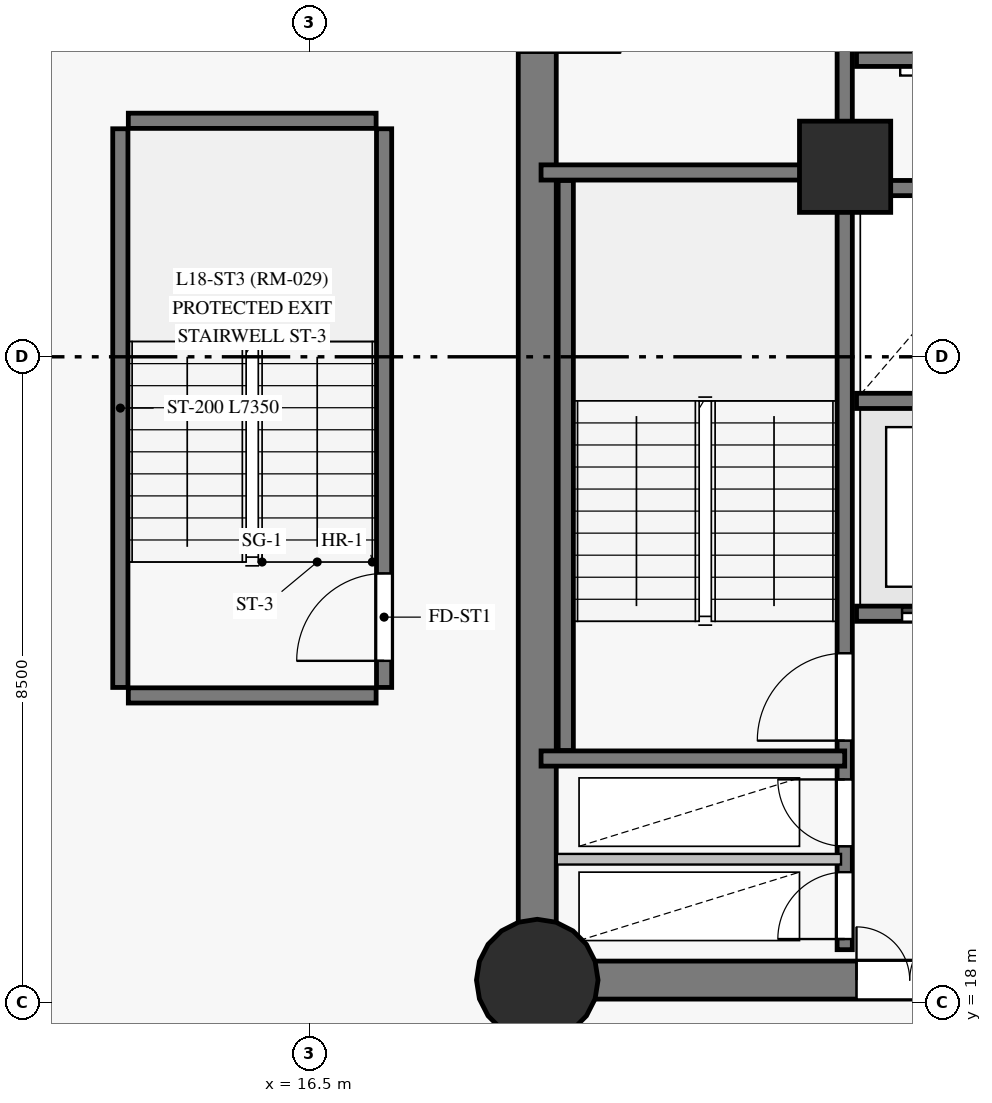
"""IFC4 building model, lengths in metres.
Left out: names, types, materials, properties, quantities, classifications, styles, units other than length and angle.
Written with IfcOpenShell. Run it as: python <this file> out.ifc"""

import sys

from ifc_helpers import new_model, si_unit, direction, frame, frame_2d, origin, origin_with_axes, origin_2d, place, context, subcontext, project, spatial, rectangle, circle, extrude, source, transform, mapped, element, fill, save


model = new_model("IFC4")
c1 = context("Model", 3, precision=1e-05, world=origin(), true_north=direction((0.0, 1.0)))
c2 = subcontext(c1, "Body", "Model", "MODEL_VIEW")
j1 = project(units=[si_unit("LENGTHUNIT", "METRE"), si_unit("PLANEANGLEUNIT", "RADIAN")], contexts=[c1])
p1 = place(None, origin())
s1 = spatial("IfcSite", under=j1, at=p1, CompositionType="ELEMENT")
p2 = place(p1, origin())
s2 = spatial("IfcBuilding", under=s1, at=p2, CompositionType="ELEMENT")
p3 = place(p2, frame((0.0, 0.0, 69.7)))
s3 = spatial("IfcBuildingStorey", under=s2, at=p3, CompositionType="ELEMENT", Elevation=69.7)
p4 = place(p3, frame((19.5, 18.3, 0.0), z_axis=(0.0, 0.0, 1.0), x_axis=(1.0, 0.0, 0.0)))
e1 = element("IfcWall", 1, at=p4, inside=s3, PredefinedType="SHEAR", context=c2, shape_type="SweptSolid", body=[
    extrude(rectangle(XDim=7.05, YDim=0.5, at=frame_2d((3.525, 0.0))), origin(), (0.0, 0.0, 1.0), 3.35),
])
p5 = place(p4, frame((4.2, 0.0, 0.0)))
e2 = element("IfcOpeningElement", 2, at=p5, cuts=e1, PredefinedType="OPENING", context=c2, shape_type="SweptSolid", body=[
    extrude(rectangle(XDim=1.4, YDim=2.2, at=frame_2d((0.7, 1.1))), frame((0.0, 0.26, 0.0), z_axis=(0.0, -1.0, 0.0), x_axis=(1.0, 0.0, 0.0)), (0.0, 0.0, 1.0), 0.52),
])
p6 = place(p3, frame((19.5, 34.7, 0.0), z_axis=(0.0, 0.0, 1.0), x_axis=(0.0, -1.0, 0.0)))
e3 = element("IfcWall", 3, at=p6, inside=s3, PredefinedType="SHEAR", context=c2, shape_type="SweptSolid", body=[
    extrude(rectangle(XDim=16.4, YDim=0.5, at=frame_2d((8.2, 0.0))), origin(), (0.0, 0.0, 1.0), 3.35),
])
p7 = place(p6, frame((3.1, 0.0, 0.0)))
e4 = element("IfcOpeningElement", 4, at=p7, cuts=e3, PredefinedType="OPENING", context=c2, shape_type="SweptSolid", body=[
    extrude(rectangle(XDim=1.1, YDim=2.15, at=frame_2d((0.55, 1.075))), frame((0.0, 0.26, 0.0), z_axis=(0.0, -1.0, 0.0), x_axis=(1.0, 0.0, 0.0)), (0.0, 0.0, 1.0), 0.52),
])
m1 = source(origin_with_axes(), c2, "Body", "SweptSolid", [
    extrude(circle(Radius=0.8, at=origin_2d()), origin(), (0.0, 0.0, 1.0), 3.6),
])
p8 = place(p3, frame((19.5, 18.3, 0.0), z_axis=(0.0, 0.0, 1.0), x_axis=(1.0, 0.0, 0.0)))
e5 = element("IfcColumn", 5, at=p8, inside=s3, PredefinedType="COLUMN", context=c2, shape_type="MappedRepresentation", body=[
    mapped(m1, transform((0.0, 0.0, 0.0), scale=1.0)),
])
m2 = source(origin_with_axes(), c2, "Body", "SweptSolid", [
    extrude(rectangle(XDim=1.2, YDim=1.2, at=origin_2d()), origin(), (0.0, 0.0, 1.0), 3.6),
])
p9 = place(p3, frame((23.55, 29.0, 0.0), z_axis=(0.0, 0.0, 1.0), x_axis=(1.0, 0.0, 0.0)))
e6 = element("IfcColumn", 6, at=p9, inside=s3, PredefinedType="COLUMN", context=c2, shape_type="MappedRepresentation", body=[
    mapped(m2, transform((0.0, 0.0, 0.0), scale=1.0)),
])
p10 = place(p3, frame((23.545, 18.7, 0.0), z_axis=(0.0, 0.0, 1.0), x_axis=(0.0, 1.0, 0.0)))
e7 = element("IfcWall", 7, at=p10, inside=s3, PredefinedType="SHEAR", context=c2, shape_type="SweptSolid", body=[
    extrude(rectangle(XDim=15.6, YDim=0.2, at=frame_2d((7.8, 0.0))), origin(), (0.0, 0.0, 1.0), 3.35),
])
p11 = place(p10, frame((2.75, 0.0, 0.0)))
e8 = element("IfcOpeningElement", 8, at=p11, cuts=e7, PredefinedType="OPENING", context=c2, shape_type="SweptSolid", body=[
    extrude(rectangle(XDim=1.15, YDim=2.15, at=frame_2d((0.575, 1.075))), frame((0.0, 0.11, 0.0), z_axis=(0.0, -1.0, 0.0), x_axis=(1.0, 0.0, 0.0)), (0.0, 0.0, 1.0), 0.22),
])
p12 = place(p10, frame((0.14, 0.0, 0.0)))
e9 = element("IfcOpeningElement", 9, at=p12, cuts=e7, PredefinedType="OPENING", context=c2, shape_type="SweptSolid", body=[
    extrude(rectangle(XDim=0.88, YDim=2.1, at=frame_2d((0.44, 1.05))), frame((0.0, 0.11, 0.0), z_axis=(0.0, -1.0, 0.0), x_axis=(1.0, 0.0, 0.0)), (0.0, 0.0, 1.0), 0.22),
])
p13 = place(p10, frame((1.36, 0.0, 0.0)))
e10 = element("IfcOpeningElement", 10, at=p13, cuts=e7, PredefinedType="OPENING", context=c2, shape_type="SweptSolid", body=[
    extrude(rectangle(XDim=0.88, YDim=2.1, at=frame_2d((0.44, 1.05))), frame((0.0, 0.11, 0.0), z_axis=(0.0, -1.0, 0.0), x_axis=(1.0, 0.0, 0.0)), (0.0, 0.0, 1.0), 0.22),
])
p14 = place(p10, frame((12.1, 0.0, 0.0)))
e11 = element("IfcOpeningElement", 11, at=p14, cuts=e7, PredefinedType="OPENING", context=c2, shape_type="SweptSolid", body=[
    extrude(rectangle(XDim=1.12, YDim=2.15, at=frame_2d((0.56, 1.075))), frame((0.0, 0.11, 0.0), z_axis=(0.0, -1.0, 0.0), x_axis=(1.0, 0.0, 0.0)), (0.0, 0.0, 1.0), 0.22),
])
p15 = place(p10, frame((14.05, 0.0, 0.0)))
e12 = element("IfcOpeningElement", 12, at=p15, cuts=e7, PredefinedType="OPENING", context=c2, shape_type="SweptSolid", body=[
    extrude(rectangle(XDim=1.12, YDim=2.15, at=frame_2d((0.56, 1.075))), frame((0.0, 0.11, 0.0), z_axis=(0.0, -1.0, 0.0), x_axis=(1.0, 0.0, 0.0)), (0.0, 0.0, 1.0), 0.22),
])
p16 = place(p3, frame((23.7, 23.12, 0.0), z_axis=(0.0, 0.0, 1.0), x_axis=(1.0, 0.0, 0.0)))
e13 = element("IfcWall", 13, at=p16, inside=s3, PredefinedType="SHEAR", context=c2, shape_type="SweptSolid", body=[
    extrude(rectangle(XDim=9.6, YDim=0.2, at=frame_2d((4.8, 0.0))), origin(), (0.0, 0.0, 1.0), 3.35),
])
p17 = place(p16, frame((0.6, 0.0, 0.0)))
e14 = element("IfcOpeningElement", 14, at=p17, cuts=e13, PredefinedType="OPENING", context=c2, shape_type="SweptSolid", body=[
    extrude(rectangle(XDim=1.1, YDim=2.15, at=frame_2d((0.55, 1.075))), frame((0.0, 0.11, 0.0), z_axis=(0.0, -1.0, 0.0), x_axis=(1.0, 0.0, 0.0)), (0.0, 0.0, 1.0), 0.22),
])
p18 = place(p16, frame((2.98, 0.0, 0.0)))
e15 = element("IfcOpeningElement", 15, at=p18, cuts=e13, PredefinedType="OPENING", context=c2, shape_type="SweptSolid", body=[
    extrude(rectangle(XDim=1.1, YDim=2.15, at=frame_2d((0.55, 1.075))), frame((0.0, 0.11, 0.0), z_axis=(0.0, -1.0, 0.0), x_axis=(1.0, 0.0, 0.0)), (0.0, 0.0, 1.0), 0.22),
])
p19 = place(p16, frame((5.36, 0.0, 0.0)))
e16 = element("IfcOpeningElement", 16, at=p19, cuts=e13, PredefinedType="OPENING", context=c2, shape_type="SweptSolid", body=[
    extrude(rectangle(XDim=1.1, YDim=2.15, at=frame_2d((0.55, 1.075))), frame((0.0, 0.11, 0.0), z_axis=(0.0, -1.0, 0.0), x_axis=(1.0, 0.0, 0.0)), (0.0, 0.0, 1.0), 0.22),
])
p20 = place(p16, frame((7.74, 0.0, 0.0)))
e17 = element("IfcOpeningElement", 17, at=p20, cuts=e13, PredefinedType="OPENING", context=c2, shape_type="SweptSolid", body=[
    extrude(rectangle(XDim=1.1, YDim=2.15, at=frame_2d((0.55, 1.075))), frame((0.0, 0.11, 0.0), z_axis=(0.0, -1.0, 0.0), x_axis=(1.0, 0.0, 0.0)), (0.0, 0.0, 1.0), 0.22),
])
for number, where, z_axis, x_axis in (
    (18, (23.7, 25.92, 0.0), (0.0, 0.0, 1.0), (1.0, 0.0, 0.0)),
    (19, (23.7, 28.72, 0.0), (0.0, 0.0, 1.0), (1.0, 0.0, 0.0)),
):
    element("IfcWall", number, at=place(p3, frame(where, z_axis=z_axis, x_axis=x_axis)), inside=s3, PredefinedType="SHEAR", context=c2, shape_type="SweptSolid", body=[
        extrude(rectangle(XDim=9.6, YDim=0.2, at=frame_2d((4.8, 0.0))), origin(), (0.0, 0.0, 1.0), 3.35),
    ])
p21 = place(p3, frame((19.875, 21.32, 0.0), z_axis=(0.0, 0.0, 1.0), x_axis=(0.0, 1.0, 0.0)))
e20 = element("IfcWall", 20, at=p21, inside=s3, PredefinedType="SHEAR", context=c2, shape_type="SweptSolid", body=[
    extrude(rectangle(XDim=7.5, YDim=0.2, at=frame_2d((3.75, 0.0))), origin(), (0.0, 0.0, 1.0), 3.35),
])
p22 = place(p3, frame((14.015, 22.15, 0.0), z_axis=(0.0, 0.0, 1.0), x_axis=(0.0, 1.0, 0.0)))
e21 = element("IfcWall", 21, at=p22, inside=s3, PredefinedType="SHEAR", context=c2, shape_type="SweptSolid", body=[
    extrude(rectangle(XDim=7.35, YDim=0.2, at=frame_2d((3.675, 0.0))), origin(), (0.0, 0.0, 1.0), 3.35),
])
p23 = place(p3, frame((17.485, 22.15, 0.0), z_axis=(0.0, 0.0, 1.0), x_axis=(0.0, 1.0, 0.0)))
e22 = element("IfcWall", 22, at=p23, inside=s3, PredefinedType="SHEAR", context=c2, shape_type="SweptSolid", body=[
    extrude(rectangle(XDim=7.35, YDim=0.2, at=frame_2d((3.675, 0.0))), origin(), (0.0, 0.0, 1.0), 3.35),
])
p24 = place(p23, frame((0.35, 0.0, 0.0)))
e23 = element("IfcOpeningElement", 23, at=p24, cuts=e22, PredefinedType="OPENING", context=c2, shape_type="SweptSolid", body=[
    extrude(rectangle(XDim=1.15, YDim=2.15, at=frame_2d((0.575, 1.075))), frame((0.0, 0.11, 0.0), z_axis=(0.0, -1.0, 0.0), x_axis=(1.0, 0.0, 0.0)), (0.0, 0.0, 1.0), 0.22),
])
for number, where, z_axis, x_axis in (
    (24, (19.55, 21.215, 0.0), (0.0, 0.0, 1.0), (1.0, 0.0, 0.0)),
    (25, (19.55, 28.925, 0.0), (0.0, 0.0, 1.0), (1.0, 0.0, 0.0)),
):
    element("IfcWall", number, at=place(p3, frame(where, z_axis=z_axis, x_axis=x_axis)), inside=s3, PredefinedType="SHEAR", context=c2, shape_type="SweptSolid", body=[
        extrude(rectangle(XDim=3.995, YDim=0.2, at=frame_2d((1.998, 0.0))), origin(), (0.0, 0.0, 1.0), 3.35),
    ])
for number, where, z_axis, x_axis in (
    (26, (14.12, 22.045, 0.0), (0.0, 0.0, 1.0), (1.0, 0.0, 0.0)),
    (27, (14.12, 29.605, 0.0), (0.0, 0.0, 1.0), (1.0, 0.0, 0.0)),
):
    element("IfcWall", number, at=place(p3, frame(where, z_axis=z_axis, x_axis=x_axis)), inside=s3, PredefinedType="SHEAR", context=c2, shape_type="SweptSolid", body=[
        extrude(rectangle(XDim=3.26, YDim=0.2, at=frame_2d((1.63, 0.0))), origin(), (0.0, 0.0, 1.0), 3.35),
    ])
p25 = place(p3, frame((23.7, 30.42, 0.0), z_axis=(0.0, 0.0, 1.0), x_axis=(1.0, 0.0, 0.0)))
e28 = element("IfcWall", 28, at=p25, inside=s3, PredefinedType="SHEAR", context=c2, shape_type="SweptSolid", body=[
    extrude(rectangle(XDim=2.78, YDim=0.2, at=frame_2d((1.39, 0.0))), origin(), (0.0, 0.0, 1.0), 3.35),
])
p26 = place(p3, frame((19.757, 19.89, 0.0), z_axis=(0.0, 0.0, 1.0), x_axis=(1.0, 0.0, 0.0)))
e29 = element("IfcWall", 29, at=p26, inside=s3, PredefinedType="PARTITIONING", context=c2, shape_type="SweptSolid", body=[
    extrude(rectangle(XDim=3.739, YDim=0.14, at=frame_2d((1.87, 0.0))), origin(), (0.0, 0.0, 1.0), 3.35),
])
m3 = source(origin_with_axes(), c2, "Body", "SweptSolid", [
    extrude(rectangle(XDim=1.15, YDim=2.15, at=frame_2d((0.575, 1.075))), frame((0.0, 0.025, 0.0), z_axis=(0.0, -1.0, 0.0), x_axis=(1.0, 0.0, 0.0)), (0.0, 0.0, 1.0), 0.05),
])
p27 = place(p11, origin())
e30 = element("IfcDoor", 30, at=p27, inside=s3, OperationType="SINGLE_SWING_LEFT", PredefinedType="DOOR", context=c2, shape_type="MappedRepresentation", body=[
    mapped(m3, transform((0.0, 0.0, 0.0), scale=1.0)),
])
fill(e8, e30)
m4 = source(origin_with_axes(), c2, "Body", "SweptSolid", [
    extrude(rectangle(XDim=1.1, YDim=2.15, at=frame_2d((0.55, 1.075))), frame((0.0, 0.025, 0.0), z_axis=(0.0, -1.0, 0.0), x_axis=(1.0, 0.0, 0.0)), (0.0, 0.0, 1.0), 0.05),
])
p28 = place(p7, origin())
e31 = element("IfcDoor", 31, at=p28, inside=s3, OperationType="SINGLE_SWING_RIGHT", PredefinedType="DOOR", context=c2, shape_type="MappedRepresentation", body=[
    mapped(m4, transform((0.0, 0.0, 0.0), scale=1.0)),
])
fill(e4, e31)
m5 = source(origin_with_axes(), c2, "Body", "SweptSolid", [
    extrude(rectangle(XDim=0.88, YDim=2.1, at=frame_2d((0.44, 1.05))), frame((0.0, 0.025, 0.0), z_axis=(0.0, -1.0, 0.0), x_axis=(1.0, 0.0, 0.0)), (0.0, 0.0, 1.0), 0.05),
])
p29 = place(p12, origin())
e32 = element("IfcDoor", 32, at=p29, inside=s3, OperationType="SINGLE_SWING_LEFT", PredefinedType="DOOR", context=c2, shape_type="MappedRepresentation", body=[
    mapped(m5, transform((0.0, 0.0, 0.0), scale=1.0)),
])
fill(e9, e32)
p30 = place(p13, origin())
e33 = element("IfcDoor", 33, at=p30, inside=s3, OperationType="SINGLE_SWING_RIGHT", PredefinedType="DOOR", context=c2, shape_type="MappedRepresentation", body=[
    mapped(m5, transform((0.0, 0.0, 0.0), scale=1.0)),
])
fill(e10, e33)
m6 = source(origin_with_axes(), c2, "Body", "SweptSolid", [
    extrude(rectangle(XDim=1.4, YDim=2.2, at=frame_2d((0.7, 1.1))), frame((0.0, 0.025, 0.0), z_axis=(0.0, -1.0, 0.0), x_axis=(1.0, 0.0, 0.0)), (0.0, 0.0, 1.0), 0.05),
])
p31 = place(p5, origin())
e34 = element("IfcDoor", 34, at=p31, inside=s3, OperationType="DOUBLE_DOOR_SINGLE_SWING", PredefinedType="DOOR", context=c2, shape_type="MappedRepresentation", body=[
    mapped(m6, transform((0.0, 0.0, 0.0), scale=1.0)),
])
fill(e2, e34)
p32 = place(p17, origin())
e35 = element("IfcDoor", 35, at=p32, inside=s3, OperationType="SLIDING_TO_LEFT", PredefinedType="DOOR", context=c2, shape_type="MappedRepresentation", body=[
    mapped(m4, transform((0.0, 0.0, 0.0), scale=1.0)),
])
fill(e14, e35)
p33 = place(p24, origin())
e36 = element("IfcDoor", 36, at=p33, inside=s3, OperationType="SINGLE_SWING_LEFT", PredefinedType="DOOR", context=c2, shape_type="MappedRepresentation", body=[
    mapped(m3, transform((0.0, 0.0, 0.0), scale=1.0)),
])
fill(e23, e36)
save(model, sys.argv[1])
